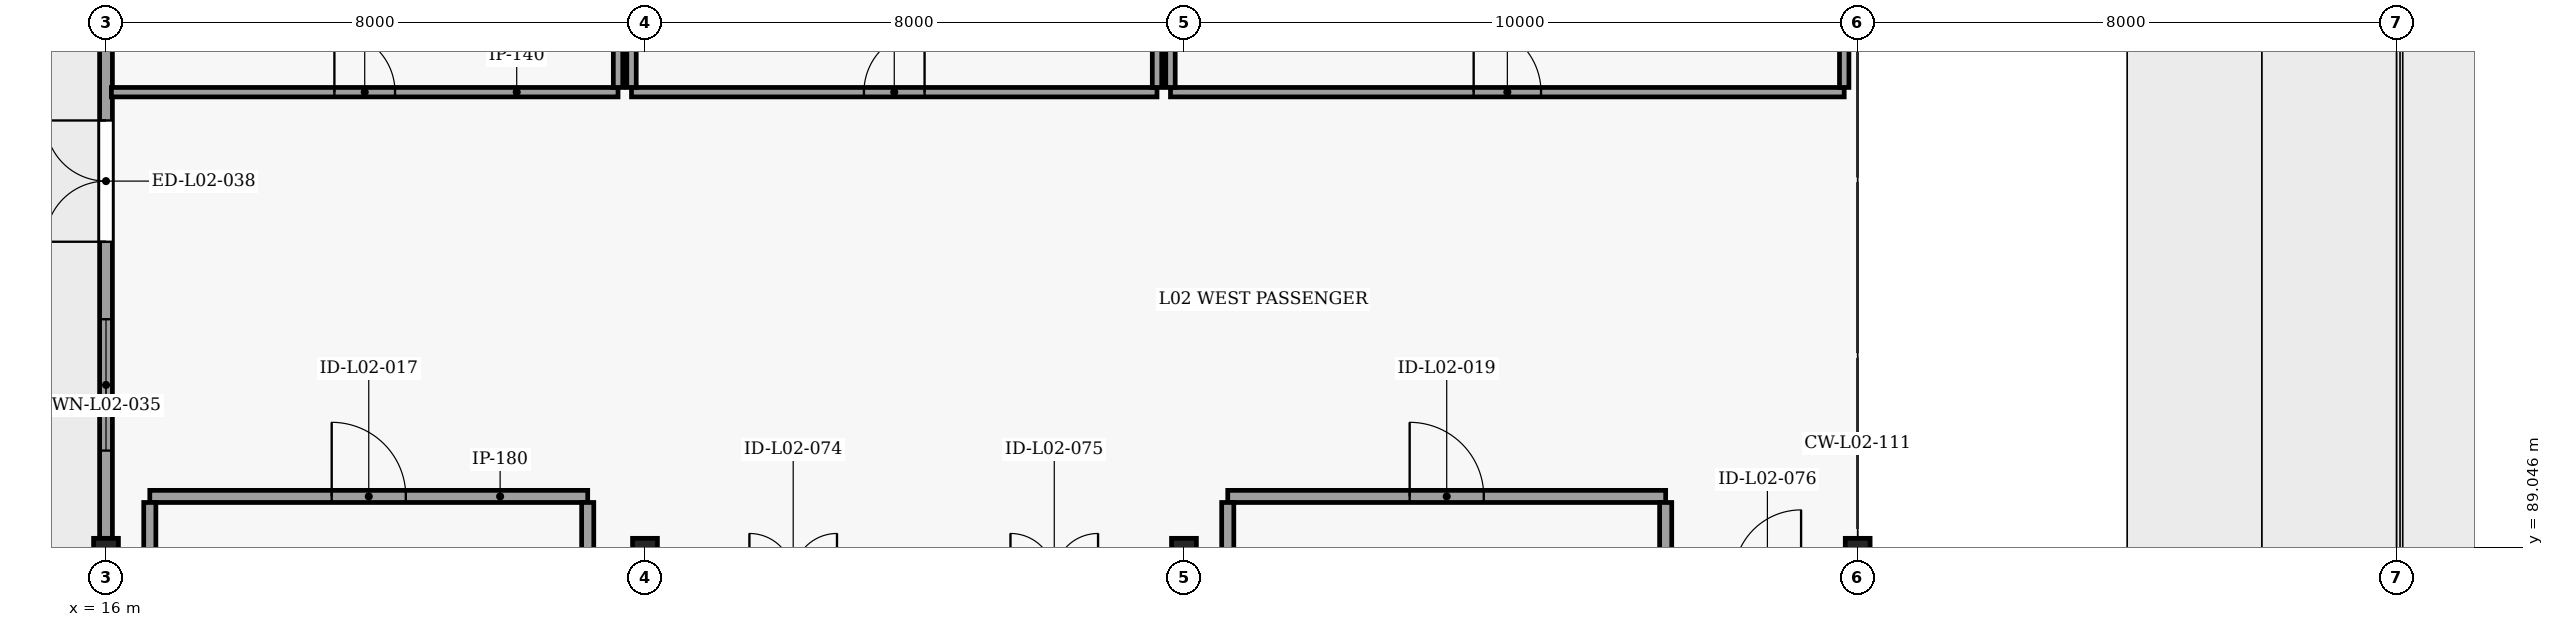
"""IFC4 building model, lengths in metres.
Left out: names, types, materials, properties, quantities, classifications, styles, units other than length and angle.
Written with IfcOpenShell. Run it as: python <this file> out.ifc"""

import sys

from ifc_helpers import new_model, si_unit, direction, frame, frame_2d, origin, origin_2d, place, context, subcontext, project, spatial, rectangle, i_section, extrude, element, fill, save


model = new_model("IFC4")
c1 = context("Model", 3, precision=1e-05, world=origin(), true_north=direction((0.0, 1.0)))
c2 = subcontext(c1, "Body", "Model", "MODEL_VIEW")
j1 = project(units=[si_unit("LENGTHUNIT", "METRE"), si_unit("PLANEANGLEUNIT", "RADIAN")], contexts=[c1])
p1 = place(None, origin())
s1 = spatial("IfcSite", under=j1, at=p1, CompositionType="ELEMENT")
p2 = place(p1, origin())
s2 = spatial("IfcBuilding", under=s1, at=p2, CompositionType="ELEMENT")
p3 = place(p2, frame((0.0, 0.0, 5.4)))
s3 = spatial("IfcBuildingStorey", under=s2, at=p3, CompositionType="ELEMENT", Elevation=5.4)
for number, where, z_axis, x_axis in (
    (1, (16.0, 89.0, 0.0), (0.0, 0.0, 1.0), (1.0, 0.0, 0.0)),
    (2, (24.0, 89.0, 0.0), (0.0, 0.0, 1.0), (1.0, 0.0, 0.0)),
    (3, (32.0, 89.0, 0.0), (0.0, 0.0, 1.0), (1.0, 0.0, 0.0)),
    (4, (42.0, 89.0, 0.0), (0.0, 0.0, 1.0), (1.0, 0.0, 0.0)),
):
    element("IfcColumn", number, at=place(p3, frame(where, z_axis=z_axis, x_axis=x_axis)), inside=s3, PredefinedType="COLUMN", context=c2, shape_type="SweptSolid", body=[
        extrude(i_section(OverallWidth=0.369, OverallDepth=0.356, WebThickness=0.011, FlangeThickness=0.018, FilletRadius=0.015, at=origin_2d()), origin(), (0.0, 0.0, 1.0), 4.56),
    ])
p4 = place(p3, frame((16.0, 78.163, 0.0), z_axis=(0.0, 0.0, 1.0), x_axis=(0.0, 1.0, 0.0)))
e5 = element("IfcWall", 5, at=p4, inside=s3, PredefinedType="SOLIDWALL", context=c2, shape_type="SweptSolid", body=[
    extrude(rectangle(XDim=11.012, YDim=0.19, at=frame_2d((5.506, 0.0))), origin(), (0.0, 0.0, 1.0), 4.141),
])
p5 = place(p4, frame((1.917, 0.0, 0.95)))
e6 = element("IfcOpeningElement", 6, at=p5, cuts=e5, PredefinedType="OPENING", context=c2, shape_type="SweptSolid", body=[
    extrude(rectangle(XDim=2.4, YDim=1.6, at=frame_2d((1.2, 0.8))), frame((0.0, 0.105, 0.0), z_axis=(0.0, -1.0, 0.0), x_axis=(1.0, 0.0, 0.0)), (0.0, 0.0, 1.0), 0.21),
])
p6 = place(p4, frame((6.117, 0.0, 0.95)))
e7 = element("IfcOpeningElement", 7, at=p6, cuts=e5, PredefinedType="OPENING", context=c2, shape_type="SweptSolid", body=[
    extrude(rectangle(XDim=2.4, YDim=1.6, at=frame_2d((1.2, 0.8))), frame((0.0, 0.105, 0.0), z_axis=(0.0, -1.0, 0.0), x_axis=(1.0, 0.0, 0.0)), (0.0, 0.0, 1.0), 0.21),
])
p7 = place(p3, frame((16.0, 89.163, 0.0), z_axis=(0.0, 0.0, 1.0), x_axis=(0.0, 1.0, 0.0)))
e8 = element("IfcWall", 8, at=p7, inside=s3, PredefinedType="SOLIDWALL", context=c2, shape_type="SweptSolid", body=[
    extrude(rectangle(XDim=11.012, YDim=0.19, at=frame_2d((5.506, 0.0))), origin(), (0.0, 0.0, 1.0), 4.141),
])
p8 = place(p7, frame((4.417, 0.0, 0.0)))
e9 = element("IfcOpeningElement", 9, at=p8, cuts=e8, PredefinedType="OPENING", context=c2, shape_type="SweptSolid", body=[
    extrude(rectangle(XDim=1.8, YDim=2.25, at=frame_2d((0.9, 1.125))), frame((0.0, 0.105, 0.0), z_axis=(0.0, -1.0, 0.0), x_axis=(1.0, 0.0, 0.0)), (0.0, 0.0, 1.0), 0.21),
])
p9 = place(p7, frame((1.317, 0.0, 0.95)))
e10 = element("IfcOpeningElement", 10, at=p9, cuts=e8, PredefinedType="OPENING", context=c2, shape_type="SweptSolid", body=[
    extrude(rectangle(XDim=1.95, YDim=1.55, at=frame_2d((0.975, 0.775))), frame((0.0, 0.105, 0.0), z_axis=(0.0, -1.0, 0.0), x_axis=(1.0, 0.0, 0.0)), (0.0, 0.0, 1.0), 0.21),
])
p10 = place(p7, frame((7.517, 0.0, 0.95)))
e11 = element("IfcOpeningElement", 11, at=p10, cuts=e8, PredefinedType="OPENING", context=c2, shape_type="SweptSolid", body=[
    extrude(rectangle(XDim=1.5, YDim=1.5, at=frame_2d((0.75, 0.75))), frame((0.0, 0.105, 0.0), z_axis=(0.0, -1.0, 0.0), x_axis=(1.0, 0.0, 0.0)), (0.0, 0.0, 1.0), 0.21),
])
p11 = place(p3, frame((16.65, 89.8, 0.0), z_axis=(0.0, 0.0, 1.0), x_axis=(1.0, 0.0, 0.0)))
e12 = element("IfcWall", 12, at=p11, inside=s3, PredefinedType="SOLIDWALL", context=c2, shape_type="SweptSolid", body=[
    extrude(rectangle(XDim=6.5, YDim=0.18, at=frame_2d((3.25, 0.0))), origin(), (0.0, 0.0, 1.0), 4.5),
])
p12 = place(p11, frame((2.7, 0.0, 0.0)))
e13 = element("IfcOpeningElement", 13, at=p12, cuts=e12, PredefinedType="OPENING", context=c2, shape_type="SweptSolid", body=[
    extrude(rectangle(XDim=1.1, YDim=2.2, at=frame_2d((0.55, 1.1))), frame((0.0, 0.1, 0.0), z_axis=(0.0, -1.0, 0.0), x_axis=(1.0, 0.0, 0.0)), (0.0, 0.0, 1.0), 0.2),
])
for number, where, z_axis, x_axis in (
    (14, (16.65, 87.2, 0.0), (0.0, 0.0, 1.0), (0.0, 1.0, 0.0)),
    (15, (23.15, 87.2, 0.0), (0.0, 0.0, 1.0), (0.0, 1.0, 0.0)),
):
    element("IfcWall", number, at=place(p3, frame(where, z_axis=z_axis, x_axis=x_axis)), inside=s3, PredefinedType="SOLIDWALL", context=c2, shape_type="SweptSolid", body=[
        extrude(rectangle(XDim=2.51, YDim=0.18, at=frame_2d((1.255, 0.0))), origin(), (0.0, 0.0, 1.0), 4.1),
    ])
p13 = place(p3, frame((32.65, 89.8, 0.0), z_axis=(0.0, 0.0, 1.0), x_axis=(1.0, 0.0, 0.0)))
e16 = element("IfcWall", 16, at=p13, inside=s3, PredefinedType="SOLIDWALL", context=c2, shape_type="SweptSolid", body=[
    extrude(rectangle(XDim=6.5, YDim=0.18, at=frame_2d((3.25, 0.0))), origin(), (0.0, 0.0, 1.0), 4.5),
])
p14 = place(p13, frame((2.7, 0.0, 0.0)))
e17 = element("IfcOpeningElement", 17, at=p14, cuts=e16, PredefinedType="OPENING", context=c2, shape_type="SweptSolid", body=[
    extrude(rectangle(XDim=1.1, YDim=2.2, at=frame_2d((0.55, 1.1))), frame((0.0, 0.1, 0.0), z_axis=(0.0, -1.0, 0.0), x_axis=(1.0, 0.0, 0.0)), (0.0, 0.0, 1.0), 0.2),
])
for number, where, z_axis, x_axis in (
    (18, (32.65, 87.2, 0.0), (0.0, 0.0, 1.0), (0.0, 1.0, 0.0)),
    (19, (39.15, 87.2, 0.0), (0.0, 0.0, 1.0), (0.0, 1.0, 0.0)),
):
    element("IfcWall", number, at=place(p3, frame(where, z_axis=z_axis, x_axis=x_axis)), inside=s3, PredefinedType="SOLIDWALL", context=c2, shape_type="SweptSolid", body=[
        extrude(rectangle(XDim=2.51, YDim=0.18, at=frame_2d((1.255, 0.0))), origin(), (0.0, 0.0, 1.0), 4.1),
    ])
p15 = place(p3, frame((16.08, 95.8, 0.0), z_axis=(0.0, 0.0, 1.0), x_axis=(1.0, 0.0, 0.0)))
e20 = element("IfcWall", 20, at=p15, inside=s3, PredefinedType="PARTITIONING", context=c2, shape_type="SweptSolid", body=[
    extrude(rectangle(XDim=7.52, YDim=0.14, at=frame_2d((3.76, 0.0))), origin(), (0.0, 0.0, 1.0), 4.5),
])
p16 = place(p15, frame((3.31, 0.0, 0.0)))
e21 = element("IfcOpeningElement", 21, at=p16, cuts=e20, PredefinedType="OPENING", context=c2, shape_type="SweptSolid", body=[
    extrude(rectangle(XDim=0.9, YDim=2.1, at=frame_2d((0.45, 1.05))), frame((0.0, 0.08, 0.0), z_axis=(0.0, -1.0, 0.0), x_axis=(1.0, 0.0, 0.0)), (0.0, 0.0, 1.0), 0.16),
])
p17 = place(p3, frame((23.6, 95.87, 0.0), z_axis=(0.0, 0.0, 1.0), x_axis=(0.0, 1.0, 0.0)))
e22 = element("IfcWall", 22, at=p17, inside=s3, PredefinedType="PARTITIONING", context=c2, shape_type="SweptSolid", body=[
    extrude(rectangle(XDim=10.05, YDim=0.14, at=frame_2d((5.025, 0.0))), origin(), (0.0, 0.0, 1.0), 4.1),
])
p18 = place(p3, frame((23.8, 95.8, 0.0), z_axis=(0.0, 0.0, 1.0), x_axis=(1.0, 0.0, 0.0)))
e23 = element("IfcWall", 23, at=p18, inside=s3, PredefinedType="PARTITIONING", context=c2, shape_type="SweptSolid", body=[
    extrude(rectangle(XDim=7.8, YDim=0.14, at=frame_2d((3.9, 0.0))), origin(), (0.0, 0.0, 1.0), 4.143),
])
p19 = place(p18, frame((3.45, 0.0, 0.0)))
e24 = element("IfcOpeningElement", 24, at=p19, cuts=e23, PredefinedType="OPENING", context=c2, shape_type="SweptSolid", body=[
    extrude(rectangle(XDim=0.9, YDim=2.1, at=frame_2d((0.45, 1.05))), frame((0.0, 0.08, 0.0), z_axis=(0.0, -1.0, 0.0), x_axis=(1.0, 0.0, 0.0)), (0.0, 0.0, 1.0), 0.16),
])
for number, where, z_axis, x_axis in (
    (25, (23.8, 95.87, 0.0), (0.0, 0.0, 1.0), (0.0, 1.0, 0.0)),
    (26, (31.6, 95.87, 0.0), (0.0, 0.0, 1.0), (0.0, 1.0, 0.0)),
):
    element("IfcWall", number, at=place(p3, frame(where, z_axis=z_axis, x_axis=x_axis)), inside=s3, PredefinedType="PARTITIONING", context=c2, shape_type="SweptSolid", body=[
        extrude(rectangle(XDim=10.05, YDim=0.14, at=frame_2d((5.025, 0.0))), origin(), (0.0, 0.0, 1.0), 4.1),
    ])
p20 = place(p3, frame((31.8, 95.8, 0.0), z_axis=(0.0, 0.0, 1.0), x_axis=(1.0, 0.0, 0.0)))
e27 = element("IfcWall", 27, at=p20, inside=s3, PredefinedType="PARTITIONING", context=c2, shape_type="SweptSolid", body=[
    extrude(rectangle(XDim=10.0, YDim=0.14, at=frame_2d((5.0, 0.0))), origin(), (0.0, 0.0, 1.0), 4.143),
])
p21 = place(p20, frame((4.5, 0.0, 0.0)))
e28 = element("IfcOpeningElement", 28, at=p21, cuts=e27, PredefinedType="OPENING", context=c2, shape_type="SweptSolid", body=[
    extrude(rectangle(XDim=1.0, YDim=2.15, at=frame_2d((0.5, 1.075))), frame((0.0, 0.08, 0.0), z_axis=(0.0, -1.0, 0.0), x_axis=(1.0, 0.0, 0.0)), (0.0, 0.0, 1.0), 0.16),
])
p22 = place(p3, frame((31.8, 95.87, 0.0), z_axis=(0.0, 0.0, 1.0), x_axis=(0.0, 1.0, 0.0)))
e29 = element("IfcWall", 29, at=p22, inside=s3, PredefinedType="PARTITIONING", context=c2, shape_type="SweptSolid", body=[
    extrude(rectangle(XDim=10.05, YDim=0.14, at=frame_2d((5.025, 0.0))), origin(), (0.0, 0.0, 1.0), 4.1),
])
p23 = place(p3, frame((41.8, 95.87, 0.0), z_axis=(0.0, 0.0, 1.0), x_axis=(0.0, 1.0, 0.0)))
e30 = element("IfcWall", 30, at=p23, inside=s3, PredefinedType="PARTITIONING", context=c2, shape_type="SweptSolid", body=[
    extrude(rectangle(XDim=10.05, YDim=0.14, at=frame_2d((5.025, 0.0))), origin(), (0.0, 0.0, 1.0), 4.033),
])
p24 = place(p8, origin())
e31 = element("IfcDoor", 31, at=p24, inside=s3, OperationType="DOUBLE_DOOR_SINGLE_SWING", PredefinedType="DOOR", context=c2, shape_type="SweptSolid", body=[
    extrude(rectangle(XDim=1.8, YDim=2.25, at=frame_2d((0.9, 1.125))), frame((0.0, 0.025, 0.0), z_axis=(0.0, -1.0, 0.0), x_axis=(1.0, 0.0, 0.0)), (0.0, 0.0, 1.0), 0.05),
])
fill(e9, e31)
p25 = place(p9, origin())
e32 = element("IfcWindow", 32, at=p25, inside=s3, PartitioningType="SINGLE_PANEL", PredefinedType="WINDOW", context=c2, shape_type="SweptSolid", body=[
    extrude(rectangle(XDim=1.95, YDim=1.55, at=frame_2d((0.975, 0.775))), frame((0.0, 0.03, 0.0), z_axis=(0.0, -1.0, 0.0), x_axis=(1.0, 0.0, 0.0)), (0.0, 0.0, 1.0), 0.06),
])
fill(e10, e32)
p26 = place(p12, origin())
e33 = element("IfcDoor", 33, at=p26, inside=s3, OperationType="SINGLE_SWING_LEFT", PredefinedType="DOOR", context=c2, shape_type="SweptSolid", body=[
    extrude(rectangle(XDim=1.1, YDim=2.2, at=frame_2d((0.55, 1.1))), frame((0.0, 0.025, 0.0), z_axis=(0.0, -1.0, 0.0), x_axis=(1.0, 0.0, 0.0)), (0.0, 0.0, 1.0), 0.05),
])
fill(e13, e33)
p27 = place(p14, origin())
e34 = element("IfcDoor", 34, at=p27, inside=s3, OperationType="SINGLE_SWING_LEFT", PredefinedType="DOOR", context=c2, shape_type="SweptSolid", body=[
    extrude(rectangle(XDim=1.1, YDim=2.2, at=frame_2d((0.55, 1.1))), frame((0.0, 0.025, 0.0), z_axis=(0.0, -1.0, 0.0), x_axis=(1.0, 0.0, 0.0)), (0.0, 0.0, 1.0), 0.05),
])
fill(e17, e34)
p28 = place(p16, origin())
e35 = element("IfcDoor", 35, at=p28, inside=s3, OperationType="SINGLE_SWING_LEFT", PredefinedType="DOOR", context=c2, shape_type="SweptSolid", body=[
    extrude(rectangle(XDim=0.9, YDim=2.1, at=frame_2d((0.45, 1.05))), frame((0.0, 0.025, 0.0), z_axis=(0.0, -1.0, 0.0), x_axis=(1.0, 0.0, 0.0)), (0.0, 0.0, 1.0), 0.05),
])
fill(e21, e35)
p29 = place(p19, origin())
e36 = element("IfcDoor", 36, at=p29, inside=s3, OperationType="SINGLE_SWING_RIGHT", PredefinedType="DOOR", context=c2, shape_type="SweptSolid", body=[
    extrude(rectangle(XDim=0.9, YDim=2.1, at=frame_2d((0.45, 1.05))), frame((0.0, 0.025, 0.0), z_axis=(0.0, -1.0, 0.0), x_axis=(1.0, 0.0, 0.0)), (0.0, 0.0, 1.0), 0.05),
])
fill(e24, e36)
p30 = place(p21, origin())
e37 = element("IfcDoor", 37, at=p30, inside=s3, OperationType="SINGLE_SWING_LEFT", PredefinedType="DOOR", context=c2, shape_type="SweptSolid", body=[
    extrude(rectangle(XDim=1.0, YDim=2.15, at=frame_2d((0.5, 1.075))), frame((0.0, 0.025, 0.0), z_axis=(0.0, -1.0, 0.0), x_axis=(1.0, 0.0, 0.0)), (0.0, 0.0, 1.0), 0.05),
])
fill(e28, e37)
save(model, sys.argv[1])
